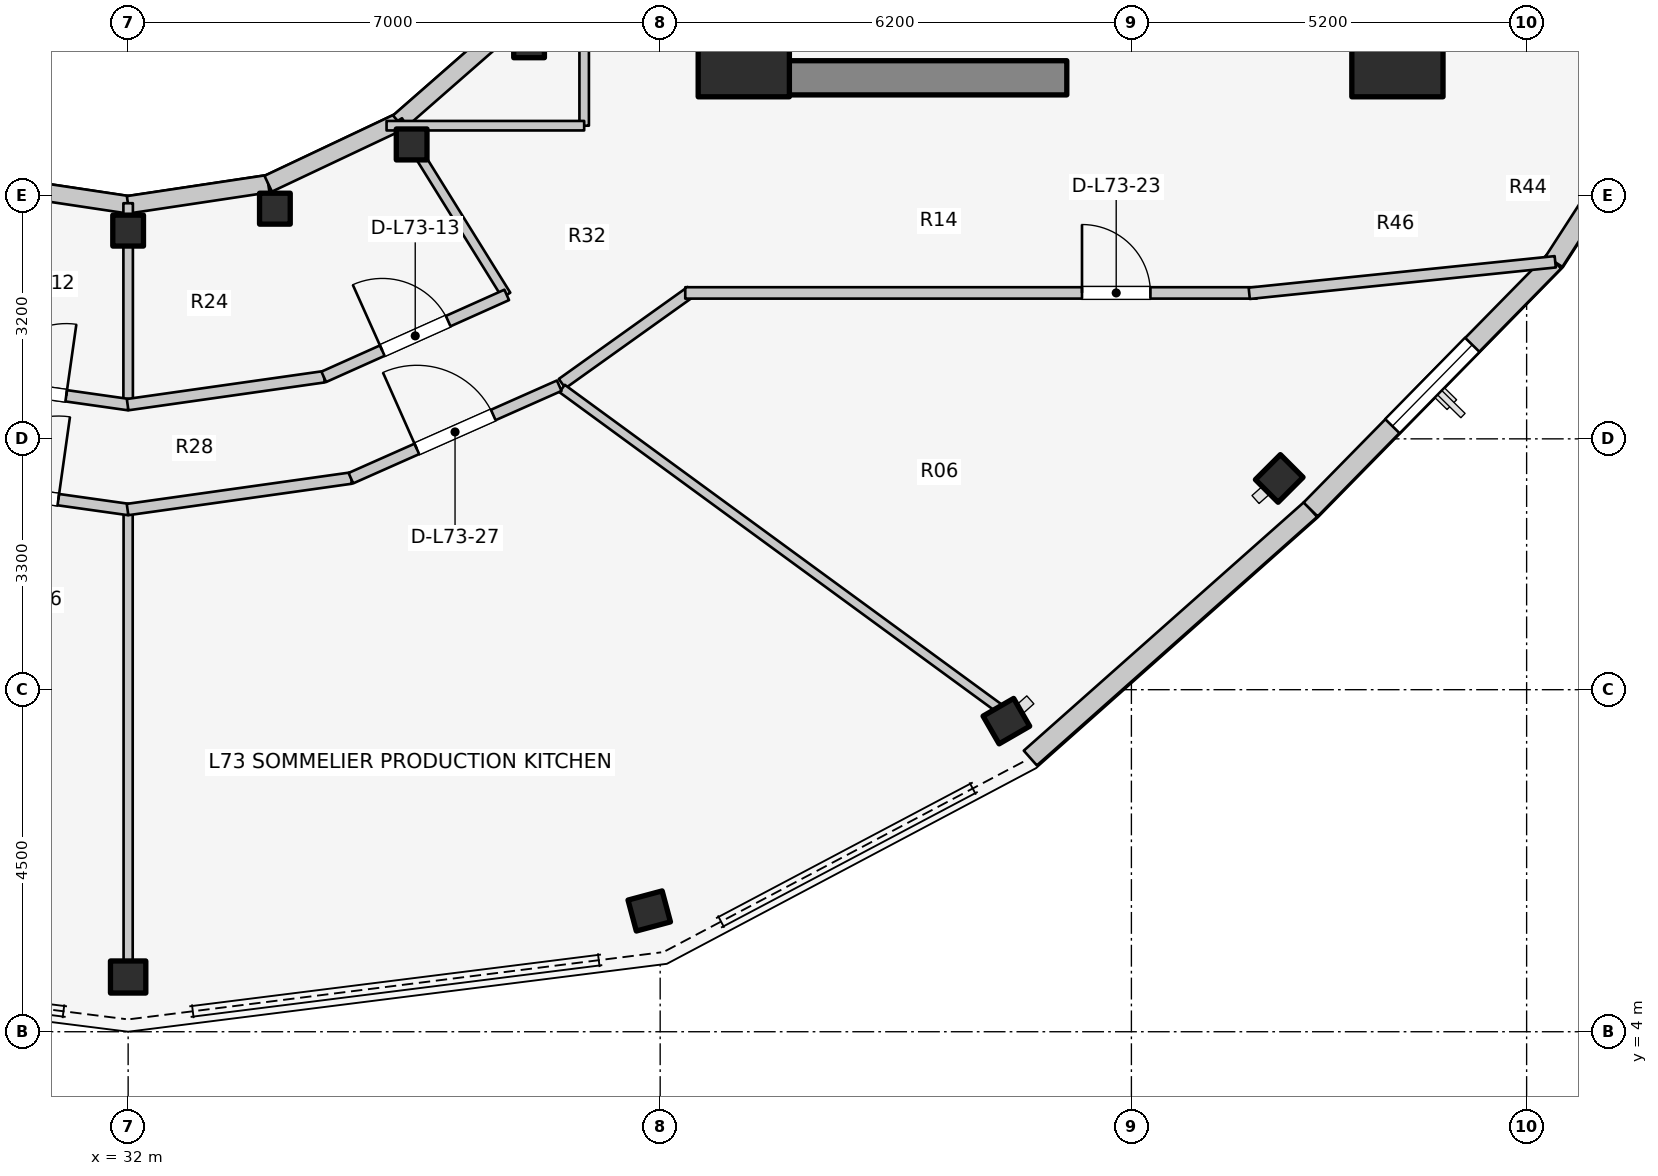
"""IFC4 building model, lengths in metres.
Left out: names, types, materials, properties, quantities, classifications, styles, units other than length and angle.
Written with IfcOpenShell. Run it as: python <this file> out.ifc"""

import sys

from ifc_helpers import new_model, si_unit, direction, frame, frame_2d, origin, origin_2d, place, context, subcontext, project, spatial, rectangle, i_section, extrude, element, fill, save


model = new_model("IFC4")
c1 = context("Model", 3, precision=1e-05, world=origin(), true_north=direction((0.0, 1.0)))
c2 = subcontext(c1, "Body", "Model", "MODEL_VIEW")
j1 = project(units=[si_unit("LENGTHUNIT", "METRE"), si_unit("PLANEANGLEUNIT", "RADIAN")], contexts=[c1])
p1 = place(None, origin())
s1 = spatial("IfcSite", under=j1, at=p1, CompositionType="ELEMENT")
p2 = place(p1, origin())
s2 = spatial("IfcBuilding", under=s1, at=p2, CompositionType="ELEMENT")
p3 = place(p2, frame((0.0, 0.0, 238.8)))
s3 = spatial("IfcBuildingStorey", under=s2, at=p3, CompositionType="ELEMENT", Elevation=238.8)
p4 = place(p3, frame((39.85, 16.55, 0.0), z_axis=(0.0, 0.0, 1.0), x_axis=(1.0, 0.0, 0.0)))
e1 = element("IfcWall", 1, at=p4, inside=s3, PredefinedType="SHEAR", context=c2, shape_type="SweptSolid", body=[
    extrude(rectangle(XDim=4.5, YDim=0.45, at=frame_2d((2.25, 0.0))), origin(), (0.0, 0.0, 1.0), 3.6),
])
for number, where, z_axis, x_axis in (
    (2, (40.1, 16.9, 0.0), (0.0, 0.0, 1.0), (1.0, 0.0, 0.0)),
    (3, (48.7, 16.9, 0.0), (0.0, 0.0, 1.0), (1.0, 0.0, 0.0)),
):
    element("IfcColumn", number, at=place(p3, frame(where, z_axis=z_axis, x_axis=x_axis)), inside=s3, PredefinedType="COLUMN", context=c2, shape_type="SweptSolid", body=[
        extrude(rectangle(XDim=1.2, YDim=1.2, at=origin_2d()), origin(), (0.0, 0.0, 1.0), 3.6),
    ])
p5 = place(p3, frame((32.0, 14.54, 0.0), z_axis=(0.0, 0.0, 1.0), x_axis=(1.0, 0.0, 0.0)))
e4 = element("IfcColumn", 4, at=p5, inside=s3, PredefinedType="COLUMN", context=c2, shape_type="SweptSolid", body=[
    extrude(i_section(OverallWidth=0.404, OverallDepth=0.407, WebThickness=0.027, FlangeThickness=0.044, FilletRadius=0.025, at=origin_2d()), origin(), (0.0, 0.0, 1.0), 3.6),
])
p6 = place(p3, frame((32.0, 4.72, 0.0), z_axis=(0.0, 0.0, 1.0), x_axis=(0.0, -1.0, 0.0)))
e5 = element("IfcColumn", 5, at=p6, inside=s3, PredefinedType="COLUMN", context=c2, shape_type="SweptSolid", body=[
    extrude(i_section(OverallWidth=0.422, OverallDepth=0.465, WebThickness=0.045, FlangeThickness=0.073, FilletRadius=0.025, at=origin_2d()), origin(), (0.0, 0.0, 1.0), 3.6),
])
p7 = place(p3, frame((33.931, 14.828, 0.0), z_axis=(0.0, 0.0, 1.0), x_axis=(1.0, 0.0, 0.0)))
e6 = element("IfcColumn", 6, at=p7, inside=s3, PredefinedType="COLUMN", context=c2, shape_type="SweptSolid", body=[
    extrude(i_section(OverallWidth=0.404, OverallDepth=0.407, WebThickness=0.027, FlangeThickness=0.044, FilletRadius=0.025, at=origin_2d()), origin(), (0.0, 0.0, 1.0), 3.6),
])
p8 = place(p3, frame((38.856, 5.589, 0.0), z_axis=(0.0, 0.0, 1.0), x_axis=(0.258819045103, -0.965925826289, 0.0)))
e7 = element("IfcColumn", 7, at=p8, inside=s3, PredefinedType="COLUMN", context=c2, shape_type="SweptSolid", body=[
    extrude(i_section(OverallWidth=0.422, OverallDepth=0.465, WebThickness=0.045, FlangeThickness=0.073, FilletRadius=0.025, at=origin_2d()), origin(), (0.0, 0.0, 1.0), 3.6),
])
p9 = place(p3, frame((35.73, 15.673, 0.0), z_axis=(0.0, 0.0, 1.0), x_axis=(1.0, 0.0, 0.0)))
e8 = element("IfcColumn", 8, at=p9, inside=s3, PredefinedType="COLUMN", context=c2, shape_type="SweptSolid", body=[
    extrude(i_section(OverallWidth=0.404, OverallDepth=0.407, WebThickness=0.027, FlangeThickness=0.044, FilletRadius=0.025, at=origin_2d()), origin(), (0.0, 0.0, 1.0), 3.6),
])
p10 = place(p3, frame((43.555, 8.086, 0.0), z_axis=(0.0, 0.0, 1.0), x_axis=(0.5, -0.866025403784, 0.0)))
e9 = element("IfcColumn", 9, at=p10, inside=s3, PredefinedType="COLUMN", context=c2, shape_type="SweptSolid", body=[
    extrude(i_section(OverallWidth=0.422, OverallDepth=0.465, WebThickness=0.045, FlangeThickness=0.073, FilletRadius=0.025, at=origin_2d()), origin(), (0.0, 0.0, 1.0), 3.6),
])
p11 = place(p3, frame((37.275, 17.018, 0.0), z_axis=(0.0, 0.0, 1.0), x_axis=(1.0, 0.0, 0.0)))
e10 = element("IfcColumn", 10, at=p11, inside=s3, PredefinedType="COLUMN", context=c2, shape_type="SweptSolid", body=[
    extrude(i_section(OverallWidth=0.404, OverallDepth=0.407, WebThickness=0.027, FlangeThickness=0.044, FilletRadius=0.025, at=origin_2d()), origin(), (0.0, 0.0, 1.0), 3.6),
])
p12 = place(p3, frame((47.145, 11.279, 0.0), z_axis=(0.0, 0.0, 1.0), x_axis=(0.707106781187, -0.707106781187, 0.0)))
e11 = element("IfcColumn", 11, at=p12, inside=s3, PredefinedType="COLUMN", context=c2, shape_type="SweptSolid", body=[
    extrude(i_section(OverallWidth=0.422, OverallDepth=0.465, WebThickness=0.045, FlangeThickness=0.073, FilletRadius=0.025, at=origin_2d()), origin(), (0.0, 0.0, 1.0), 3.6),
])
for number, where, z_axis, x_axis in (
    (12, (30.157, 15.157, 0.0), (0.0, 0.0, 1.0), (0.989, -0.149, 0.0)),
    (13, (32.0, 14.88, 0.0), (0.0, 0.0, 1.0), (0.989, 0.149, 0.0)),
):
    element("IfcWall", number, at=place(p3, frame(where, z_axis=z_axis, x_axis=x_axis)), inside=s3, PredefinedType="STANDARD", context=c2, shape_type="SweptSolid", body=[
        extrude(rectangle(XDim=1.864, YDim=0.23, at=frame_2d((0.932, 0.0))), origin(), (0.0, 0.0, 1.0), 2.6),
    ])
p13 = place(p3, frame((33.843, 15.157, 0.0), z_axis=(0.0, 0.0, 1.0), x_axis=(0.904179699603, 0.427152280606, 0.0)))
e14 = element("IfcWall", 14, at=p13, inside=s3, PredefinedType="STANDARD", context=c2, shape_type="SweptSolid", body=[
    extrude(rectangle(XDim=1.899, YDim=0.23, at=frame_2d((0.95, 0.0))), origin(), (0.0, 0.0, 1.0), 2.6),
])
p14 = place(p3, frame((35.56, 15.968, 0.0), z_axis=(0.0, 0.0, 1.0), x_axis=(0.752576694707, 0.658504607869, 0.0)))
e15 = element("IfcWall", 15, at=p14, inside=s3, PredefinedType="STANDARD", context=c2, shape_type="SweptSolid", body=[
    extrude(rectangle(XDim=1.959, YDim=0.23, at=frame_2d((0.98, 0.0))), origin(), (0.0, 0.0, 1.0), 2.6),
])
p15 = place(p3, frame((43.87, 7.601, 0.0), z_axis=(0.0, 0.0, 1.0), x_axis=(0.748165854006, 0.663511759428, 0.0)))
e16 = element("IfcWall", 16, at=p15, inside=s3, PredefinedType="STANDARD", context=c2, shape_type="SweptSolid", body=[
    extrude(rectangle(XDim=4.929, YDim=0.26, at=frame_2d((2.464, 0.0))), origin(), (0.0, 0.0, 1.0), 3.29),
])
p16 = place(p3, frame((47.558, 10.871, 0.0), z_axis=(0.0, 0.0, 1.0), x_axis=(0.700642973333, 0.713512034881, 0.0)))
e17 = element("IfcWall", 17, at=p16, inside=s3, PredefinedType="STANDARD", context=c2, shape_type="SweptSolid", body=[
    extrude(rectangle(XDim=4.572, YDim=0.26, at=frame_2d((2.286, 0.0))), origin(), (0.0, 0.0, 1.0), 3.29),
])
p17 = place(p16, frame((1.536, 0.0, 0.75)))
e18 = element("IfcOpeningElement", 18, at=p17, cuts=e17, PredefinedType="OPENING", context=c2, shape_type="SweptSolid", body=[
    extrude(rectangle(XDim=1.5, YDim=1.6, at=frame_2d((0.75, 0.8))), frame((0.0, 0.14, 0.0), z_axis=(0.0, -1.0, 0.0), x_axis=(1.0, 0.0, 0.0)), (0.0, 0.0, 1.0), 0.28),
])
p18 = place(p3, frame((50.761, 14.133, 0.0), z_axis=(0.0, 0.0, 1.0), x_axis=(0.542641766008, 0.839964233634, 0.0)))
e19 = element("IfcWall", 19, at=p18, inside=s3, PredefinedType="STANDARD", context=c2, shape_type="SweptSolid", body=[
    extrude(rectangle(XDim=4.319, YDim=0.26, at=frame_2d((2.16, 0.0))), origin(), (0.0, 0.0, 1.0), 3.29),
])
p19 = place(p18, frame((1.41, 0.0, 0.75)))
e20 = element("IfcOpeningElement", 20, at=p19, cuts=e19, PredefinedType="OPENING", context=c2, shape_type="SweptSolid", body=[
    extrude(rectangle(XDim=1.5, YDim=1.6, at=frame_2d((0.75, 0.8))), frame((0.0, 0.14, 0.0), z_axis=(0.0, -1.0, 0.0), x_axis=(1.0, 0.0, 0.0)), (0.0, 0.0, 1.0), 0.28),
])
p20 = place(p3, frame((32.0, 14.9, 0.0), z_axis=(0.0, 0.0, 1.0), x_axis=(0.0, -1.0, 0.0)))
e21 = element("IfcWall", 21, at=p20, inside=s3, PredefinedType="PARTITIONING", context=c2, shape_type="SweptSolid", body=[
    extrude(rectangle(XDim=2.65, YDim=0.125, at=frame_2d((1.325, 0.0))), origin(), (0.0, 0.0, 1.0), 2.672),
])
p21 = place(p3, frame((35.55, 15.985, 0.0), z_axis=(0.0, 0.0, 1.0), x_axis=(0.527527080983, -0.849538215049, 0.0)))
e22 = element("IfcWall", 22, at=p21, inside=s3, PredefinedType="PARTITIONING", context=c2, shape_type="SweptSolid", body=[
    extrude(rectangle(XDim=2.701, YDim=0.125, at=frame_2d((1.351, 0.0))), origin(), (0.0, 0.0, 1.0), 2.672),
])
p22 = place(p3, frame((29.423, 12.617, 0.0), z_axis=(0.0, 0.0, 1.0), x_axis=(0.990078185178, -0.140517569133, 0.0)))
e23 = element("IfcWall", 23, at=p22, inside=s3, PredefinedType="PARTITIONING", context=c2, shape_type="SweptSolid", body=[
    extrude(rectangle(XDim=2.61, YDim=0.15, at=frame_2d((1.305, 0.0))), origin(), (0.0, 0.0, 1.0), 2.816),
])
p23 = place(p22, frame((0.83, 0.0, 0.0)))
e24 = element("IfcOpeningElement", 24, at=p23, cuts=e23, PredefinedType="OPENING", context=c2, shape_type="SweptSolid", body=[
    extrude(rectangle(XDim=0.95, YDim=2.1, at=frame_2d((0.475, 1.05))), frame((0.0, 0.085, 0.0), z_axis=(0.0, -1.0, 0.0), x_axis=(1.0, 0.0, 0.0)), (0.0, 0.0, 1.0), 0.17),
])
p24 = place(p3, frame((31.993, 12.25, 0.0), z_axis=(0.0, 0.0, 1.0), x_axis=(0.990078185178, 0.140517569133, 0.0)))
e25 = element("IfcWall", 25, at=p24, inside=s3, PredefinedType="PARTITIONING", context=c2, shape_type="SweptSolid", body=[
    extrude(rectangle(XDim=2.61, YDim=0.15, at=frame_2d((1.305, 0.0))), origin(), (0.0, 0.0, 1.0), 2.816),
])
p25 = place(p3, frame((34.573, 12.616, 0.0), z_axis=(0.0, 0.0, 1.0), x_axis=(0.912628408652, 0.408790151203, 0.0)))
e26 = element("IfcWall", 26, at=p25, inside=s3, PredefinedType="PARTITIONING", context=c2, shape_type="SweptSolid", body=[
    extrude(rectangle(XDim=2.638, YDim=0.15, at=frame_2d((1.319, 0.0))), origin(), (0.0, 0.0, 1.0), 2.816),
])
p26 = place(p25, frame((0.844, 0.0, 0.0)))
e27 = element("IfcOpeningElement", 27, at=p26, cuts=e26, PredefinedType="OPENING", context=c2, shape_type="SweptSolid", body=[
    extrude(rectangle(XDim=0.95, YDim=2.1, at=frame_2d((0.475, 1.05))), frame((0.0, 0.085, 0.0), z_axis=(0.0, -1.0, 0.0), x_axis=(1.0, 0.0, 0.0)), (0.0, 0.0, 1.0), 0.17),
])
p27 = place(p3, frame((38.0, 15.92, 0.0), z_axis=(0.0, 0.0, 1.0), x_axis=(0.0, 1.0, 0.0)))
e28 = element("IfcWall", 28, at=p27, inside=s3, PredefinedType="PARTITIONING", context=c2, shape_type="SweptSolid", body=[
    extrude(rectangle(XDim=4.28, YDim=0.125, at=frame_2d((2.14, 0.0))), origin(), (0.0, 0.0, 1.0), 2.672),
])
p28 = place(p3, frame((35.4, 15.92, 0.0), z_axis=(0.0, 0.0, 1.0), x_axis=(1.0, 0.0, 0.0)))
e29 = element("IfcWall", 29, at=p28, inside=s3, PredefinedType="PARTITIONING", context=c2, shape_type="SweptSolid", body=[
    extrude(rectangle(XDim=2.6, YDim=0.125, at=frame_2d((1.3, 0.0))), origin(), (0.0, 0.0, 1.0), 2.672),
])
p29 = place(p3, frame((37.71, 12.527, 0.0), z_axis=(0.0, 0.0, 1.0), x_axis=(0.813780999276, 0.581171648669, 0.0)))
e30 = element("IfcWall", 30, at=p29, inside=s3, PredefinedType="PARTITIONING", context=c2, shape_type="SweptSolid", body=[
    extrude(rectangle(XDim=2.082, YDim=0.15, at=frame_2d((1.041, 0.0))), origin(), (0.0, 0.0, 1.0), 2.816),
])
p30 = place(p3, frame((39.33, 13.72, 0.0), z_axis=(0.0, 0.0, 1.0), x_axis=(1.0, 0.0, 0.0)))
e31 = element("IfcWall", 31, at=p30, inside=s3, PredefinedType="PARTITIONING", context=c2, shape_type="SweptSolid", body=[
    extrude(rectangle(XDim=7.52, YDim=0.15, at=frame_2d((3.76, 0.0))), origin(), (0.0, 0.0, 1.0), 2.816),
])
p31 = place(p30, frame((5.22, 0.0, 0.0)))
e32 = element("IfcOpeningElement", 32, at=p31, cuts=e31, PredefinedType="OPENING", context=c2, shape_type="SweptSolid", body=[
    extrude(rectangle(XDim=0.9, YDim=2.1, at=frame_2d((0.45, 1.05))), frame((0.0, 0.085, 0.0), z_axis=(0.0, -1.0, 0.0), x_axis=(1.0, 0.0, 0.0)), (0.0, 0.0, 1.0), 0.17),
])
p32 = place(p3, frame((46.75, 13.715, 0.0), z_axis=(0.0, 0.0, 1.0), x_axis=(0.994734711466, 0.102483431859, 0.0)))
e33 = element("IfcWall", 33, at=p32, inside=s3, PredefinedType="PARTITIONING", context=c2, shape_type="SweptSolid", body=[
    extrude(rectangle(XDim=4.047, YDim=0.15, at=frame_2d((2.024, 0.0))), origin(), (0.0, 0.0, 1.0), 2.66),
])
p33 = place(p3, frame((32.0, 10.815, 0.0), z_axis=(0.0, 0.0, 1.0), x_axis=(0.0, -1.0, 0.0)))
e34 = element("IfcWall", 34, at=p33, inside=s3, PredefinedType="MOVABLE", context=c2, shape_type="SweptSolid", body=[
    extrude(rectangle(XDim=5.895, YDim=0.12, at=frame_2d((2.948, 0.0))), origin(), (0.0, 0.0, 1.0), 2.66),
])
p34 = place(p3, frame((37.709, 12.463, 0.0), z_axis=(0.0, 0.0, 1.0), x_axis=(0.807095694912, -0.590420646027, 0.0)))
e35 = element("IfcWall", 35, at=p34, inside=s3, PredefinedType="MOVABLE", context=c2, shape_type="SweptSolid", body=[
    extrude(rectangle(XDim=7.119, YDim=0.12, at=frame_2d((3.56, 0.0))), origin(), (0.0, 0.0, 1.0), 2.66),
])
p35 = place(p3, frame((29.066, 11.284, 0.0), z_axis=(0.0, 0.0, 1.0), x_axis=(0.990252860391, -0.139281271128, 0.0)))
e36 = element("IfcWall", 36, at=p35, inside=s3, PredefinedType="PARTITIONING", context=c2, shape_type="SweptSolid", body=[
    extrude(rectangle(XDim=2.971, YDim=0.15, at=frame_2d((1.486, 0.0))), origin(), (0.0, 0.0, 1.0), 2.816),
])
p36 = place(p35, frame((0.936, 0.0, 0.0)))
e37 = element("IfcOpeningElement", 37, at=p36, cuts=e36, PredefinedType="OPENING", context=c2, shape_type="SweptSolid", body=[
    extrude(rectangle(XDim=1.1, YDim=2.1, at=frame_2d((0.55, 1.05))), frame((0.0, 0.085, 0.0), z_axis=(0.0, -1.0, 0.0), x_axis=(1.0, 0.0, 0.0)), (0.0, 0.0, 1.0), 0.17),
])
p37 = place(p3, frame((31.992, 10.87, 0.0), z_axis=(0.0, 0.0, 1.0), x_axis=(0.990252860391, 0.139281271128, 0.0)))
e38 = element("IfcWall", 38, at=p37, inside=s3, PredefinedType="PARTITIONING", context=c2, shape_type="SweptSolid", body=[
    extrude(rectangle(XDim=2.971, YDim=0.15, at=frame_2d((1.486, 0.0))), origin(), (0.0, 0.0, 1.0), 2.816),
])
p38 = place(p3, frame((34.93, 11.283, 0.0), z_axis=(0.0, 0.0, 1.0), x_axis=(0.914043013008, 0.4056172708, 0.0)))
e39 = element("IfcWall", 39, at=p38, inside=s3, PredefinedType="PARTITIONING", context=c2, shape_type="SweptSolid", body=[
    extrude(rectangle(XDim=2.999, YDim=0.15, at=frame_2d((1.5, 0.0))), origin(), (0.0, 0.0, 1.0), 2.816),
])
p39 = place(p38, frame((0.949, 0.0, 0.0)))
e40 = element("IfcOpeningElement", 40, at=p39, cuts=e39, PredefinedType="OPENING", context=c2, shape_type="SweptSolid", body=[
    extrude(rectangle(XDim=1.1, YDim=2.1, at=frame_2d((0.55, 1.05))), frame((0.0, 0.085, 0.0), z_axis=(0.0, -1.0, 0.0), x_axis=(1.0, 0.0, 0.0)), (0.0, 0.0, 1.0), 0.17),
])
p40 = place(p17, origin())
e41 = element("IfcWindow", 41, at=p40, inside=s3, PartitioningType="SINGLE_PANEL", PredefinedType="WINDOW", context=c2, shape_type="SweptSolid", body=[
    extrude(rectangle(XDim=1.5, YDim=1.6, at=frame_2d((0.75, 0.8))), frame((0.0, 0.03, 0.0), z_axis=(0.0, -1.0, 0.0), x_axis=(1.0, 0.0, 0.0)), (0.0, 0.0, 1.0), 0.06),
])
fill(e18, e41)
p41 = place(p23, origin())
e42 = element("IfcDoor", 42, at=p41, inside=s3, OperationType="SINGLE_SWING_RIGHT", PredefinedType="DOOR", context=c2, shape_type="SweptSolid", body=[
    extrude(rectangle(XDim=0.95, YDim=2.1, at=frame_2d((0.475, 1.05))), frame((0.0, 0.025, 0.0), z_axis=(0.0, -1.0, 0.0), x_axis=(1.0, 0.0, 0.0)), (0.0, 0.0, 1.0), 0.05),
])
fill(e24, e42)
p42 = place(p26, origin())
e43 = element("IfcDoor", 43, at=p42, inside=s3, OperationType="SINGLE_SWING_LEFT", PredefinedType="DOOR", context=c2, shape_type="SweptSolid", body=[
    extrude(rectangle(XDim=0.95, YDim=2.1, at=frame_2d((0.475, 1.05))), frame((0.0, 0.025, 0.0), z_axis=(0.0, -1.0, 0.0), x_axis=(1.0, 0.0, 0.0)), (0.0, 0.0, 1.0), 0.05),
])
fill(e27, e43)
p43 = place(p31, origin())
e44 = element("IfcDoor", 44, at=p43, inside=s3, OperationType="SINGLE_SWING_LEFT", PredefinedType="DOOR", context=c2, shape_type="SweptSolid", body=[
    extrude(rectangle(XDim=0.9, YDim=2.1, at=frame_2d((0.45, 1.05))), frame((0.0, 0.025, 0.0), z_axis=(0.0, -1.0, 0.0), x_axis=(1.0, 0.0, 0.0)), (0.0, 0.0, 1.0), 0.05),
])
fill(e32, e44)
p44 = place(p36, origin())
e45 = element("IfcDoor", 45, at=p44, inside=s3, OperationType="SINGLE_SWING_RIGHT", PredefinedType="DOOR", context=c2, shape_type="SweptSolid", body=[
    extrude(rectangle(XDim=1.1, YDim=2.1, at=frame_2d((0.55, 1.05))), frame((0.0, 0.025, 0.0), z_axis=(0.0, -1.0, 0.0), x_axis=(1.0, 0.0, 0.0)), (0.0, 0.0, 1.0), 0.05),
])
fill(e37, e45)
p45 = place(p39, origin())
e46 = element("IfcDoor", 46, at=p45, inside=s3, OperationType="SINGLE_SWING_LEFT", PredefinedType="DOOR", context=c2, shape_type="SweptSolid", body=[
    extrude(rectangle(XDim=1.1, YDim=2.1, at=frame_2d((0.55, 1.05))), frame((0.0, 0.025, 0.0), z_axis=(0.0, -1.0, 0.0), x_axis=(1.0, 0.0, 0.0)), (0.0, 0.0, 1.0), 0.05),
])
fill(e40, e46)
save(model, sys.argv[1])
